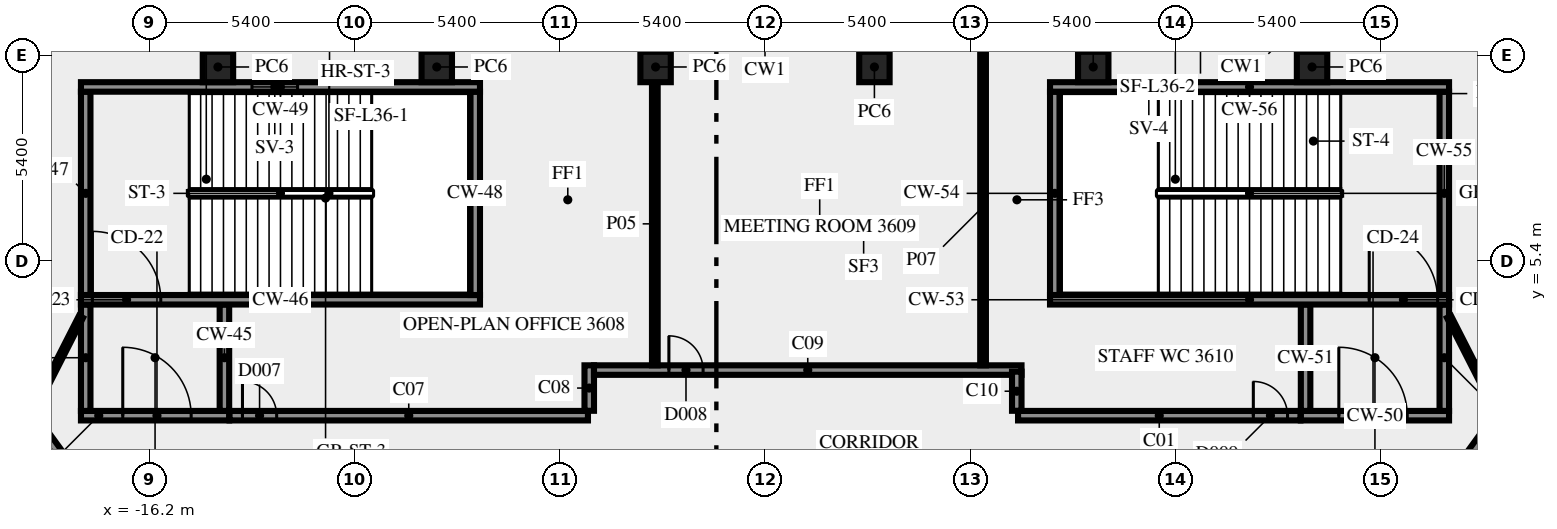
"""IFC4 building model, lengths in metres.
Left out: names, types, materials, properties, quantities, classifications, styles, units other than length and angle.
Written with IfcOpenShell. Run it as: python <this file> out.ifc"""

import sys

from ifc_helpers import new_model, si_unit, direction, frame, frame_2d, origin, origin_2d, place, context, subcontext, project, spatial, rectangle, extrude, element, fill, save


model = new_model("IFC4")
c1 = context("Model", 3, precision=1e-05, world=origin(), true_north=direction((0.0, 1.0)))
c2 = subcontext(c1, "Body", "Model", "MODEL_VIEW")
j1 = project(units=[si_unit("LENGTHUNIT", "METRE"), si_unit("PLANEANGLEUNIT", "RADIAN")], contexts=[c1])
p1 = place(None, origin())
s1 = spatial("IfcSite", under=j1, at=p1, CompositionType="ELEMENT")
p2 = place(p1, origin())
s2 = spatial("IfcBuilding", under=s1, at=p2, CompositionType="ELEMENT")
p3 = place(p2, frame((0.0, 0.0, 156.0)))
s3 = spatial("IfcBuildingStorey", under=s2, at=p3, CompositionType="ELEMENT", Elevation=156.0)
for number, where, z_axis, x_axis in (
    (1, (14.395, 10.5, 0.0), (0.0, 0.0, 1.0), (-1.0, 0.0, 0.0)),
    (2, (8.637, 10.5, 0.0), (0.0, 0.0, 1.0), (-1.0, 0.0, 0.0)),
    (3, (2.879, 10.5, 0.0), (0.0, 0.0, 1.0), (-1.0, 0.0, 0.0)),
    (4, (-2.879, 10.5, 0.0), (0.0, 0.0, 1.0), (-1.0, 0.0, 0.0)),
    (5, (-8.637, 10.5, 0.0), (0.0, 0.0, 1.0), (-1.0, 0.0, 0.0)),
    (6, (-14.395, 10.5, 0.0), (0.0, 0.0, 1.0), (-1.0, 0.0, 0.0)),
):
    element("IfcColumn", number, at=place(p3, frame(where, z_axis=z_axis, x_axis=x_axis)), inside=s3, PredefinedType="COLUMN", context=c2, shape_type="SweptSolid", body=[
        extrude(rectangle(XDim=0.8, YDim=0.8, at=origin_2d()), origin(), (0.0, 0.0, 1.0), 3.65),
    ])
p4 = place(p3, frame((-18.0, 1.325, 0.0), z_axis=(0.0, 0.0, 1.0), x_axis=(1.0, 0.0, 0.0)))
e7 = element("IfcWall", 7, at=p4, inside=s3, PredefinedType="SHEAR", context=c2, shape_type="SweptSolid", body=[
    extrude(rectangle(XDim=3.9, YDim=0.25, at=frame_2d((1.95, 0.0))), origin(), (0.0, 0.0, 1.0), 3.65),
])
p5 = place(p4, frame((1.1, 0.0, 0.0)))
e8 = element("IfcOpeningElement", 8, at=p5, cuts=e7, PredefinedType="OPENING", context=c2, shape_type="SweptSolid", body=[
    extrude(rectangle(XDim=1.8, YDim=2.1, at=frame_2d((0.9, 1.05))), frame((0.0, 0.135, 0.0), z_axis=(0.0, -1.0, 0.0), x_axis=(1.0, 0.0, 0.0)), (0.0, 0.0, 1.0), 0.27),
])
for number, where, z_axis, x_axis in (
    (9, (-17.875, 1.45, 0.0), (0.0, 0.0, 1.0), (0.0, 1.0, 0.0)),
    (10, (-14.225, 1.45, 0.0), (0.0, 0.0, 1.0), (0.0, 1.0, 0.0)),
):
    element("IfcWall", number, at=place(p3, frame(where, z_axis=z_axis, x_axis=x_axis)), inside=s3, PredefinedType="SHEAR", context=c2, shape_type="SweptSolid", body=[
        extrude(rectangle(XDim=2.8, YDim=0.25, at=frame_2d((1.4, 0.0))), origin(), (0.0, 0.0, 1.0), 3.65),
    ])
p6 = place(p3, frame((-18.0, 4.375, 0.0), z_axis=(0.0, 0.0, 1.0), x_axis=(1.0, 0.0, 0.0)))
e11 = element("IfcWall", 11, at=p6, inside=s3, PredefinedType="SHEAR", context=c2, shape_type="SweptSolid", body=[
    extrude(rectangle(XDim=10.5, YDim=0.25, at=frame_2d((5.25, 0.0))), origin(), (0.0, 0.0, 1.0), 3.65),
])
p7 = place(p6, frame((0.3, 0.0, 0.0)))
e12 = element("IfcOpeningElement", 12, at=p7, cuts=e11, PredefinedType="OPENING", context=c2, shape_type="SweptSolid", body=[
    extrude(rectangle(XDim=1.8, YDim=2.1, at=frame_2d((0.9, 1.05))), frame((0.0, 0.135, 0.0), z_axis=(0.0, -1.0, 0.0), x_axis=(1.0, 0.0, 0.0)), (0.0, 0.0, 1.0), 0.27),
])
for number, where, z_axis, x_axis in (
    (13, (-17.875, 4.5, 0.0), (0.0, 0.0, 1.0), (0.0, 1.0, 0.0)),
    (14, (-7.625, 4.5, 0.0), (0.0, 0.0, 1.0), (0.0, 1.0, 0.0)),
):
    element("IfcWall", number, at=place(p3, frame(where, z_axis=z_axis, x_axis=x_axis)), inside=s3, PredefinedType="SHEAR", context=c2, shape_type="SweptSolid", body=[
        extrude(rectangle(XDim=5.35, YDim=0.25, at=frame_2d((2.675, 0.0))), origin(), (0.0, 0.0, 1.0), 3.65),
    ])
p8 = place(p3, frame((-18.0, 9.975, 0.0), z_axis=(0.0, 0.0, 1.0), x_axis=(1.0, 0.0, 0.0)))
e15 = element("IfcWall", 15, at=p8, inside=s3, PredefinedType="SHEAR", context=c2, shape_type="SweptSolid", body=[
    extrude(rectangle(XDim=10.5, YDim=0.25, at=frame_2d((5.25, 0.0))), origin(), (0.0, 0.0, 1.0), 3.65),
])
p9 = place(p8, frame((4.5, 0.0, 1.0)))
e16 = element("IfcOpeningElement", 16, at=p9, cuts=e15, PredefinedType="OPENING", context=c2, shape_type="SweptSolid", body=[
    extrude(rectangle(XDim=1.2, YDim=1.2, at=frame_2d((0.6, 0.6))), frame((0.0, 0.135, 0.0), z_axis=(0.0, -1.0, 0.0), x_axis=(1.0, 0.0, 0.0)), (0.0, 0.0, 1.0), 0.27),
])
p10 = place(p3, frame((14.1, 1.325, 0.0), z_axis=(0.0, 0.0, 1.0), x_axis=(1.0, 0.0, 0.0)))
e17 = element("IfcWall", 17, at=p10, inside=s3, PredefinedType="SHEAR", context=c2, shape_type="SweptSolid", body=[
    extrude(rectangle(XDim=3.9, YDim=0.25, at=frame_2d((1.95, 0.0))), origin(), (0.0, 0.0, 1.0), 3.65),
])
p11 = place(p10, frame((1.0, 0.0, 0.0)))
e18 = element("IfcOpeningElement", 18, at=p11, cuts=e17, PredefinedType="OPENING", context=c2, shape_type="SweptSolid", body=[
    extrude(rectangle(XDim=1.8, YDim=2.1, at=frame_2d((0.9, 1.05))), frame((0.0, 0.135, 0.0), z_axis=(0.0, -1.0, 0.0), x_axis=(1.0, 0.0, 0.0)), (0.0, 0.0, 1.0), 0.27),
])
for number, where, z_axis, x_axis in (
    (19, (14.225, 1.45, 0.0), (0.0, 0.0, 1.0), (0.0, 1.0, 0.0)),
    (20, (17.875, 1.45, 0.0), (0.0, 0.0, 1.0), (0.0, 1.0, 0.0)),
):
    element("IfcWall", number, at=place(p3, frame(where, z_axis=z_axis, x_axis=x_axis)), inside=s3, PredefinedType="SHEAR", context=c2, shape_type="SweptSolid", body=[
        extrude(rectangle(XDim=2.8, YDim=0.25, at=frame_2d((1.4, 0.0))), origin(), (0.0, 0.0, 1.0), 3.65),
    ])
p12 = place(p3, frame((7.5, 4.375, 0.0), z_axis=(0.0, 0.0, 1.0), x_axis=(1.0, 0.0, 0.0)))
e21 = element("IfcWall", 21, at=p12, inside=s3, PredefinedType="SHEAR", context=c2, shape_type="SweptSolid", body=[
    extrude(rectangle(XDim=10.5, YDim=0.25, at=frame_2d((5.25, 0.0))), origin(), (0.0, 0.0, 1.0), 3.65),
])
p13 = place(p12, frame((8.4, 0.0, 0.0)))
e22 = element("IfcOpeningElement", 22, at=p13, cuts=e21, PredefinedType="OPENING", context=c2, shape_type="SweptSolid", body=[
    extrude(rectangle(XDim=1.8, YDim=2.1, at=frame_2d((0.9, 1.05))), frame((0.0, 0.135, 0.0), z_axis=(0.0, -1.0, 0.0), x_axis=(1.0, 0.0, 0.0)), (0.0, 0.0, 1.0), 0.27),
])
for number, where, z_axis, x_axis in (
    (23, (7.625, 4.5, 0.0), (0.0, 0.0, 1.0), (0.0, 1.0, 0.0)),
    (24, (17.875, 4.5, 0.0), (0.0, 0.0, 1.0), (0.0, 1.0, 0.0)),
):
    element("IfcWall", number, at=place(p3, frame(where, z_axis=z_axis, x_axis=x_axis)), inside=s3, PredefinedType="SHEAR", context=c2, shape_type="SweptSolid", body=[
        extrude(rectangle(XDim=5.35, YDim=0.25, at=frame_2d((2.675, 0.0))), origin(), (0.0, 0.0, 1.0), 3.65),
    ])
p14 = place(p3, frame((7.5, 9.975, 0.0), z_axis=(0.0, 0.0, 1.0), x_axis=(1.0, 0.0, 0.0)))
e25 = element("IfcWall", 25, at=p14, inside=s3, PredefinedType="SHEAR", context=c2, shape_type="SweptSolid", body=[
    extrude(rectangle(XDim=10.5, YDim=0.25, at=frame_2d((5.25, 0.0))), origin(), (0.0, 0.0, 1.0), 3.65),
])
p15 = place(p14, frame((2.0, 0.0, 1.0)))
e26 = element("IfcOpeningElement", 26, at=p15, cuts=e25, PredefinedType="OPENING", context=c2, shape_type="SweptSolid", body=[
    extrude(rectangle(XDim=1.2, YDim=1.2, at=frame_2d((0.6, 0.6))), frame((0.0, 0.135, 0.0), z_axis=(0.0, -1.0, 0.0), x_axis=(1.0, 0.0, 0.0)), (0.0, 0.0, 1.0), 0.27),
])
p16 = place(p3, frame((6.659, 1.325, 0.0), z_axis=(0.0, 0.0, 1.0), x_axis=(1.0, 0.0, 0.0)))
e27 = element("IfcWall", 27, at=p16, inside=s3, PredefinedType="SOLIDWALL", context=c2, shape_type="SweptSolid", body=[
    extrude(rectangle(XDim=7.431, YDim=0.25, at=frame_2d((3.716, 0.0))), origin(), (0.0, 0.0, 1.0), 3.65),
])
p17 = place(p16, frame((6.191, 0.0, 0.0)))
e28 = element("IfcOpeningElement", 28, at=p17, cuts=e27, PredefinedType="OPENING", context=c2, shape_type="SweptSolid", body=[
    extrude(rectangle(XDim=0.9, YDim=2.1, at=frame_2d((0.45, 1.05))), frame((0.0, 0.135, 0.0), z_axis=(0.0, -1.0, 0.0), x_axis=(1.0, 0.0, 0.0)), (0.0, 0.0, 1.0), 0.27),
])
p18 = place(p3, frame((17.545, -1.125, 0.0), z_axis=(0.0, 0.0, 1.0), x_axis=(0.587786330937, 0.809016210693, 0.0)))
e29 = element("IfcWall", 29, at=p18, inside=s3, PredefinedType="SOLIDWALL", context=c2, shape_type="SweptSolid", body=[
    extrude(rectangle(XDim=30.103, YDim=0.25, at=frame_2d((15.052, 0.0))), origin(), (0.0, 0.0, 1.0), 3.65),
])
p19 = place(p18, frame((3.441, 0.0, 0.0)))
e30 = element("IfcOpeningElement", 30, at=p19, cuts=e29, PredefinedType="OPENING", context=c2, shape_type="SweptSolid", body=[
    extrude(rectangle(XDim=0.9, YDim=2.1, at=frame_2d((0.45, 1.05))), frame((0.0, 0.135, 0.0), z_axis=(0.0, -1.0, 0.0), x_axis=(1.0, 0.0, 0.0)), (0.0, 0.0, 1.0), 0.27),
])
p20 = place(p18, frame((28.729, 0.0, 0.0)))
e31 = element("IfcOpeningElement", 31, at=p20, cuts=e29, PredefinedType="OPENING", context=c2, shape_type="SweptSolid", body=[
    extrude(rectangle(XDim=0.9, YDim=2.1, at=frame_2d((0.45, 1.05))), frame((0.0, 0.135, 0.0), z_axis=(0.0, -1.0, 0.0), x_axis=(1.0, 0.0, 0.0)), (0.0, 0.0, 1.0), 0.27),
])
p21 = place(p3, frame((-38.32, 27.469, 0.0), z_axis=(0.0, 0.0, 1.0), x_axis=(0.587788021768, -0.809014982226, 0.0)))
e32 = element("IfcWall", 32, at=p21, inside=s3, PredefinedType="SOLIDWALL", context=c2, shape_type="SweptSolid", body=[
    extrude(rectangle(XDim=35.344, YDim=0.25, at=frame_2d((17.672, 0.0))), origin(), (0.0, 0.0, 1.0), 3.65),
])
p22 = place(p21, frame((31.003, 0.0, 0.0)))
e33 = element("IfcOpeningElement", 33, at=p22, cuts=e32, PredefinedType="OPENING", context=c2, shape_type="SweptSolid", body=[
    extrude(rectangle(XDim=0.9, YDim=2.1, at=frame_2d((0.45, 1.05))), frame((0.0, 0.135, 0.0), z_axis=(0.0, -1.0, 0.0), x_axis=(1.0, 0.0, 0.0)), (0.0, 0.0, 1.0), 0.27),
])
p23 = place(p21, frame((16.687, 0.0, 0.0)))
e34 = element("IfcOpeningElement", 34, at=p23, cuts=e32, PredefinedType="OPENING", context=c2, shape_type="SweptSolid", body=[
    extrude(rectangle(XDim=0.9, YDim=2.1, at=frame_2d((0.45, 1.05))), frame((0.0, 0.135, 0.0), z_axis=(0.0, -1.0, 0.0), x_axis=(1.0, 0.0, 0.0)), (0.0, 0.0, 1.0), 0.27),
])
p24 = place(p3, frame((-14.09, 1.325, 0.0), z_axis=(0.0, 0.0, 1.0), x_axis=(1.0, 0.0, 0.0)))
e35 = element("IfcWall", 35, at=p24, inside=s3, PredefinedType="SOLIDWALL", context=c2, shape_type="SweptSolid", body=[
    extrude(rectangle(XDim=9.431, YDim=0.25, at=frame_2d((4.716, 0.0))), origin(), (0.0, 0.0, 1.0), 3.65),
])
p25 = place(p24, frame((0.34, 0.0, 0.0)))
e36 = element("IfcOpeningElement", 36, at=p25, cuts=e35, PredefinedType="OPENING", context=c2, shape_type="SweptSolid", body=[
    extrude(rectangle(XDim=0.9, YDim=2.1, at=frame_2d((0.45, 1.05))), frame((0.0, 0.135, 0.0), z_axis=(0.0, -1.0, 0.0), x_axis=(1.0, 0.0, 0.0)), (0.0, 0.0, 1.0), 0.27),
])
p26 = place(p3, frame((-4.625, 1.454, 0.0), z_axis=(0.0, 0.0, 1.0), x_axis=(0.0, 1.0, 0.0)))
e37 = element("IfcWall", 37, at=p26, inside=s3, PredefinedType="SOLIDWALL", context=c2, shape_type="SweptSolid", body=[
    extrude(rectangle(XDim=1.196, YDim=0.25, at=frame_2d((0.598, 0.0))), origin(), (0.0, 0.0, 1.0), 3.65),
])
p27 = place(p3, frame((-4.5, 2.525, 0.0), z_axis=(0.0, 0.0, 1.0), x_axis=(1.0, 0.0, 0.0)))
e38 = element("IfcWall", 38, at=p27, inside=s3, PredefinedType="SOLIDWALL", context=c2, shape_type="SweptSolid", body=[
    extrude(rectangle(XDim=11.25, YDim=0.25, at=frame_2d((5.625, 0.0))), origin(), (0.0, 0.0, 1.0), 3.65),
])
p28 = place(p27, frame((1.971, 0.0, 0.0)))
e39 = element("IfcOpeningElement", 39, at=p28, cuts=e38, PredefinedType="OPENING", context=c2, shape_type="SweptSolid", body=[
    extrude(rectangle(XDim=0.9, YDim=2.1, at=frame_2d((0.45, 1.05))), frame((0.0, 0.135, 0.0), z_axis=(0.0, -1.0, 0.0), x_axis=(1.0, 0.0, 0.0)), (0.0, 0.0, 1.0), 0.27),
])
p29 = place(p3, frame((6.625, 2.484, 0.0), z_axis=(0.0, 0.0, 1.0), x_axis=(0.0, -1.0, 0.0)))
e40 = element("IfcWall", 40, at=p29, inside=s3, PredefinedType="SOLIDWALL", context=c2, shape_type="SweptSolid", body=[
    extrude(rectangle(XDim=1.03, YDim=0.25, at=frame_2d((0.515, 0.0))), origin(), (0.0, 0.0, 1.0), 3.65),
])
p30 = place(p3, frame((-2.899, 2.65, 0.0), z_axis=(0.0, 0.0, 1.0), x_axis=(0.0, 1.0, 0.0)))
e41 = element("IfcWall", 41, at=p30, inside=s3, PredefinedType="PARTITIONING", context=c2, shape_type="SweptSolid", body=[
    extrude(rectangle(XDim=7.445, YDim=0.15, at=frame_2d((3.723, 0.0))), origin(), (0.0, 0.0, 1.0), 3.65),
])
p31 = place(p3, frame((5.738, 2.65, 0.0), z_axis=(0.0, 0.0, 1.0), x_axis=(0.0, 1.0, 0.0)))
e42 = element("IfcWall", 42, at=p31, inside=s3, PredefinedType="PARTITIONING", context=c2, shape_type="SweptSolid", body=[
    extrude(rectangle(XDim=8.35, YDim=0.15, at=frame_2d((4.175, 0.0))), origin(), (0.0, 0.0, 1.0), 2.85),
])
for number, where, z_axis, x_axis in (
    (43, (18.0, 3.925, 0.0), (0.0, 0.0, 1.0), (0.454, -0.891, 0.0)),
    (44, (-19.261, 1.45, 0.0), (0.0, 0.0, 1.0), (0.454, 0.891, 0.0)),
):
    element("IfcWall", number, at=place(p3, frame(where, z_axis=z_axis, x_axis=x_axis)), inside=s3, PredefinedType="PARTITIONING", context=c2, shape_type="SweptSolid", body=[
        extrude(rectangle(XDim=2.778, YDim=0.12, at=frame_2d((1.389, 0.0))), origin(), (0.0, 0.0, 1.0), 3.65),
    ])
p32 = place(p5, origin())
e45 = element("IfcDoor", 45, at=p32, inside=s3, OperationType="DOUBLE_DOOR_SINGLE_SWING", PredefinedType="DOOR", context=c2, shape_type="SweptSolid", body=[
    extrude(rectangle(XDim=1.8, YDim=2.1, at=frame_2d((0.9, 1.05))), frame((0.0, 0.025, 0.0), z_axis=(0.0, -1.0, 0.0), x_axis=(1.0, 0.0, 0.0)), (0.0, 0.0, 1.0), 0.05),
])
fill(e8, e45)
p33 = place(p7, origin())
e46 = element("IfcDoor", 46, at=p33, inside=s3, OperationType="DOUBLE_DOOR_SINGLE_SWING", PredefinedType="DOOR", context=c2, shape_type="SweptSolid", body=[
    extrude(rectangle(XDim=1.8, YDim=2.1, at=frame_2d((0.9, 1.05))), frame((0.0, 0.025, 0.0), z_axis=(0.0, -1.0, 0.0), x_axis=(1.0, 0.0, 0.0)), (0.0, 0.0, 1.0), 0.05),
])
fill(e12, e46)
p34 = place(p9, origin())
e47 = element("IfcWindow", 47, at=p34, inside=s3, PartitioningType="SINGLE_PANEL", PredefinedType="WINDOW", context=c2, shape_type="SweptSolid", body=[
    extrude(rectangle(XDim=1.2, YDim=1.2, at=frame_2d((0.6, 0.6))), frame((0.0, 0.03, 0.0), z_axis=(0.0, -1.0, 0.0), x_axis=(1.0, 0.0, 0.0)), (0.0, 0.0, 1.0), 0.06),
])
fill(e16, e47)
p35 = place(p11, origin())
e48 = element("IfcDoor", 48, at=p35, inside=s3, OperationType="DOUBLE_DOOR_SINGLE_SWING", PredefinedType="DOOR", context=c2, shape_type="SweptSolid", body=[
    extrude(rectangle(XDim=1.8, YDim=2.1, at=frame_2d((0.9, 1.05))), frame((0.0, 0.025, 0.0), z_axis=(0.0, -1.0, 0.0), x_axis=(1.0, 0.0, 0.0)), (0.0, 0.0, 1.0), 0.05),
])
fill(e18, e48)
p36 = place(p13, origin())
e49 = element("IfcDoor", 49, at=p36, inside=s3, OperationType="DOUBLE_DOOR_SINGLE_SWING", PredefinedType="DOOR", context=c2, shape_type="SweptSolid", body=[
    extrude(rectangle(XDim=1.8, YDim=2.1, at=frame_2d((0.9, 1.05))), frame((0.0, 0.025, 0.0), z_axis=(0.0, -1.0, 0.0), x_axis=(1.0, 0.0, 0.0)), (0.0, 0.0, 1.0), 0.05),
])
fill(e22, e49)
p37 = place(p15, origin())
e50 = element("IfcWindow", 50, at=p37, inside=s3, PartitioningType="SINGLE_PANEL", PredefinedType="WINDOW", context=c2, shape_type="SweptSolid", body=[
    extrude(rectangle(XDim=1.2, YDim=1.2, at=frame_2d((0.6, 0.6))), frame((0.0, 0.03, 0.0), z_axis=(0.0, -1.0, 0.0), x_axis=(1.0, 0.0, 0.0)), (0.0, 0.0, 1.0), 0.06),
])
fill(e26, e50)
p38 = place(p25, origin())
e51 = element("IfcDoor", 51, at=p38, inside=s3, OperationType="SINGLE_SWING_LEFT", PredefinedType="DOOR", context=c2, shape_type="SweptSolid", body=[
    extrude(rectangle(XDim=0.9, YDim=2.1, at=frame_2d((0.45, 1.05))), frame((0.0, 0.025, 0.0), z_axis=(0.0, -1.0, 0.0), x_axis=(1.0, 0.0, 0.0)), (0.0, 0.0, 1.0), 0.05),
])
fill(e36, e51)
p39 = place(p28, origin())
e52 = element("IfcDoor", 52, at=p39, inside=s3, OperationType="SINGLE_SWING_LEFT", PredefinedType="DOOR", context=c2, shape_type="SweptSolid", body=[
    extrude(rectangle(XDim=0.9, YDim=2.1, at=frame_2d((0.45, 1.05))), frame((0.0, 0.025, 0.0), z_axis=(0.0, -1.0, 0.0), x_axis=(1.0, 0.0, 0.0)), (0.0, 0.0, 1.0), 0.05),
])
fill(e39, e52)
p40 = place(p17, origin())
e53 = element("IfcDoor", 53, at=p40, inside=s3, OperationType="SINGLE_SWING_RIGHT", PredefinedType="DOOR", context=c2, shape_type="SweptSolid", body=[
    extrude(rectangle(XDim=0.9, YDim=2.1, at=frame_2d((0.45, 1.05))), frame((0.0, 0.025, 0.0), z_axis=(0.0, -1.0, 0.0), x_axis=(1.0, 0.0, 0.0)), (0.0, 0.0, 1.0), 0.05),
])
fill(e28, e53)
save(model, sys.argv[1])
